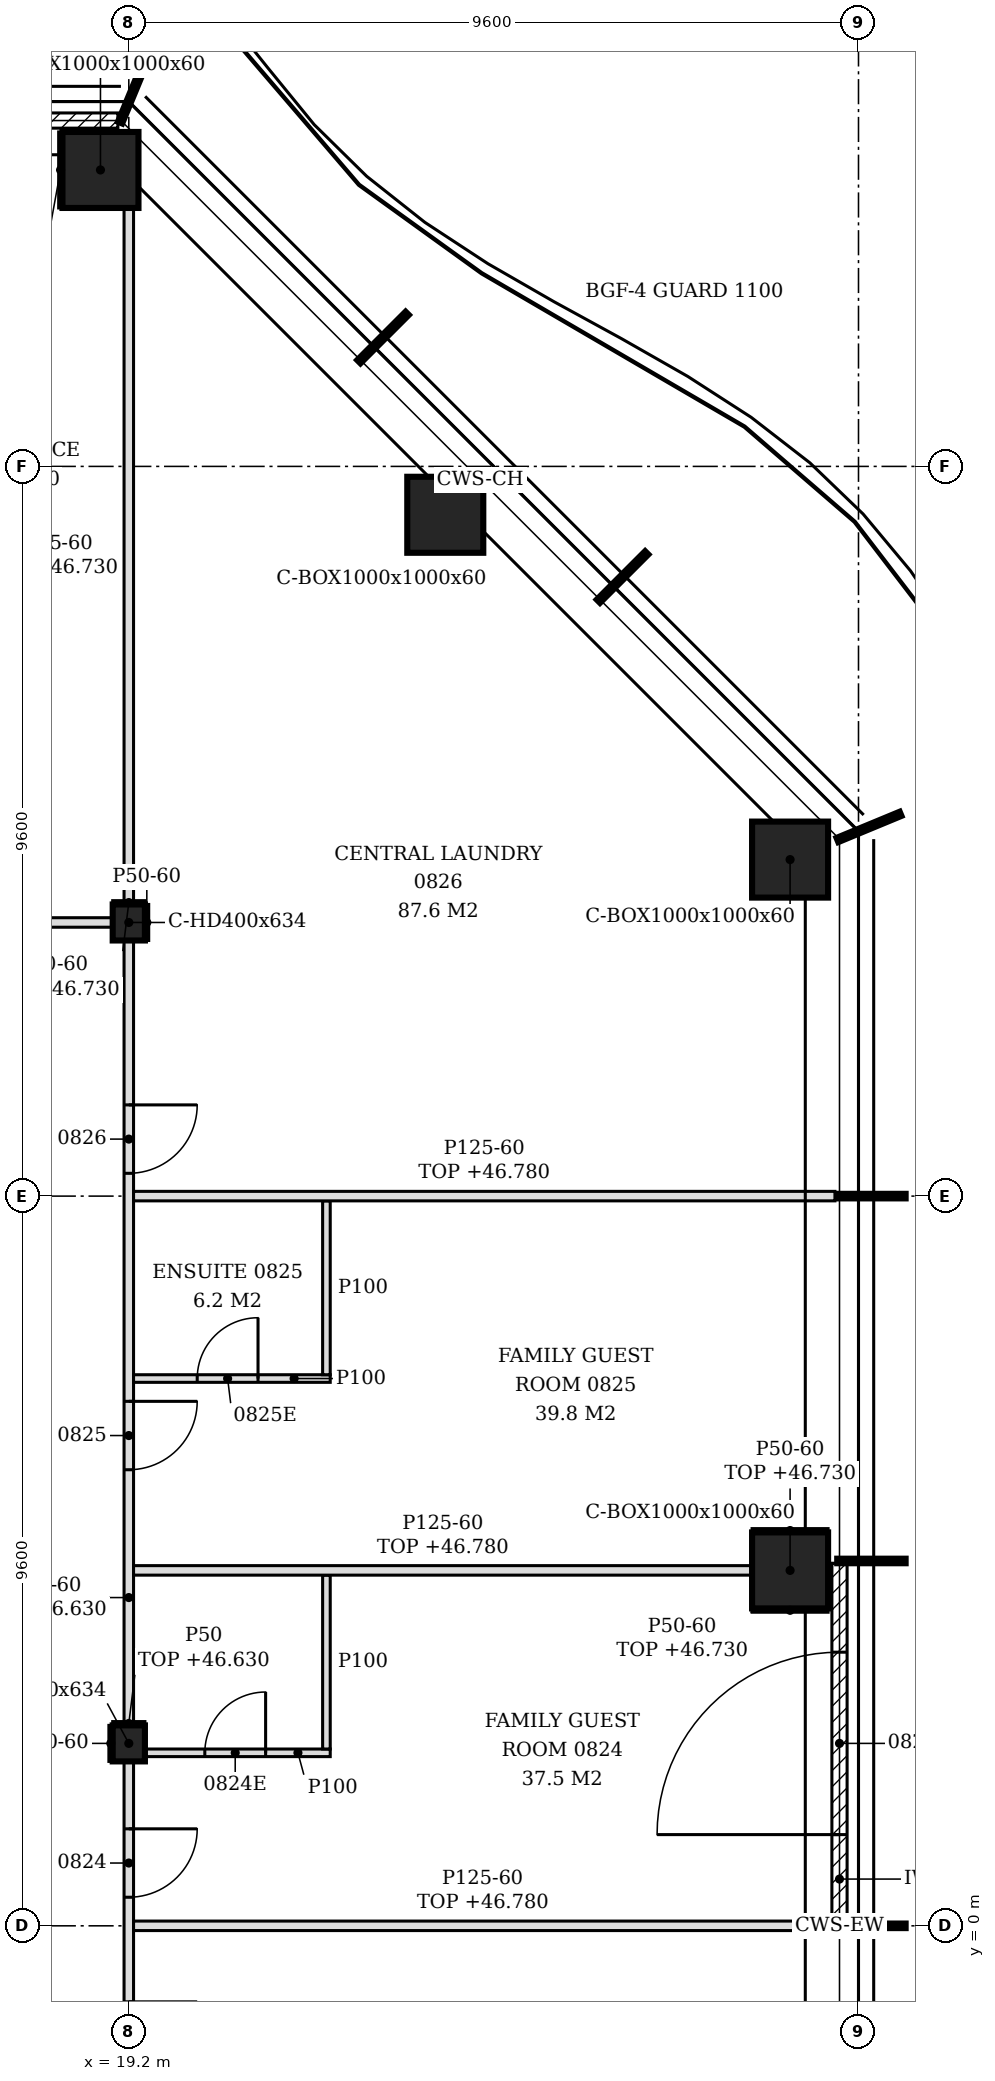
"""IFC4 building model, lengths in metres.
Left out: names, types, materials, properties, quantities, classifications, styles, units other than length and angle.
Written with IfcOpenShell. Run it as: python <this file> out.ifc"""

import sys

from ifc_helpers import new_model, si_unit, direction, frame, frame_2d, origin, origin_2d, place, context, subcontext, project, spatial, polyline, rectangle, hollow_rectangle, i_section, outline, extrude, element, fill, save


model = new_model("IFC4")
c1 = context("Model", 3, precision=1e-05, world=origin(), true_north=direction((0.0, 1.0)))
c2 = subcontext(c1, "Body", "Model", "MODEL_VIEW")
j1 = project(units=[si_unit("LENGTHUNIT", "METRE"), si_unit("PLANEANGLEUNIT", "RADIAN")], contexts=[c1])
p1 = place(None, origin())
s1 = spatial("IfcSite", under=j1, at=p1, CompositionType="ELEMENT")
p2 = place(p1, origin())
s2 = spatial("IfcBuilding", under=s1, at=p2, CompositionType="ELEMENT")
p3 = place(p2, frame((0.0, 0.0, 43.8)))
s3 = spatial("IfcBuildingStorey", under=s2, at=p3, CompositionType="ELEMENT", Elevation=43.8)
for number, where, z_axis, x_axis in (
    (1, (27.9, 4.676, -0.15), (0.0, 0.0, 1.0), (1.0, 0.0, 0.0)),
    (2, (27.9, 14.027, -0.15), (0.0, 0.0, 1.0), (1.0, 0.0, 0.0)),
    (3, (23.364, 18.564, -0.15), (0.0, 0.0, 1.0), (1.0, 0.0, 0.0)),
    (4, (18.827, 23.1, -0.15), (0.0, 0.0, 1.0), (1.0, 0.0, 0.0)),
):
    element("IfcColumn", number, at=place(p3, frame(where, z_axis=z_axis, x_axis=x_axis)), inside=s3, PredefinedType="COLUMN", context=c2, shape_type="SweptSolid", body=[
        extrude(hollow_rectangle(XDim=1.0, YDim=1.0, WallThickness=0.06, at=origin_2d()), origin(), (0.0, 0.0, 1.0), 3.6),
    ])
for number, where, z_axis, x_axis in (
    (5, (19.2, 2.4, -0.15), (0.0, 0.0, 1.0), (1.0, 0.0, 0.0)),
    (6, (19.2, 13.2, -0.15), (0.0, 0.0, 1.0), (1.0, 0.0, 0.0)),
):
    element("IfcColumn", number, at=place(p3, frame(where, z_axis=z_axis, x_axis=x_axis)), inside=s3, PredefinedType="COLUMN", context=c2, shape_type="SweptSolid", body=[
        extrude(i_section(OverallWidth=0.424, OverallDepth=0.474, WebThickness=0.048, FlangeThickness=0.077, FilletRadius=0.015, at=origin_2d()), origin(), (0.0, 0.0, 1.0), 3.6),
    ])
p4 = place(p3, frame((28.55, 0.03, 0.0), z_axis=(0.0, 0.0, 1.0), x_axis=(0.0, 1.0, 0.0)))
e7 = element("IfcWall", 7, at=p4, inside=s3, PredefinedType="NOTDEFINED", context=c2, shape_type="SweptSolid", body=[
    extrude(rectangle(XDim=4.74, YDim=0.2, at=frame_2d((2.37, 0.0))), origin(), (0.0, 0.0, 1.0), 3.45),
])
p5 = place(p4, frame((1.17, 0.0, 0.0)))
e8 = element("IfcOpeningElement", 8, at=p5, cuts=e7, PredefinedType="OPENING", context=c2, shape_type="SweptSolid", body=[
    extrude(rectangle(XDim=2.4, YDim=2.4, at=frame_2d((1.2, 1.2))), frame((0.0, 0.11, 0.0), z_axis=(0.0, -1.0, 0.0), x_axis=(1.0, 0.0, 0.0)), (0.0, 0.0, 1.0), 0.22),
])
p6 = place(p3, frame((19.056, 23.75, 0.0), z_axis=(0.0, 0.0, 1.0), x_axis=(-1.0, 0.0, 0.0)))
e9 = element("IfcWall", 9, at=p6, inside=s3, PredefinedType="NOTDEFINED", context=c2, shape_type="SweptSolid", body=[
    extrude(rectangle(XDim=4.626, YDim=0.2, at=frame_2d((2.313, 0.0))), origin(), (0.0, 0.0, 1.0), 3.45),
])
p7 = place(p6, frame((1.108, 0.0, 0.0)))
e10 = element("IfcOpeningElement", 10, at=p7, cuts=e9, PredefinedType="OPENING", context=c2, shape_type="SweptSolid", body=[
    extrude(rectangle(XDim=2.4, YDim=2.4, at=frame_2d((1.2, 1.2))), frame((0.0, 0.11, 0.0), z_axis=(0.0, -1.0, 0.0), x_axis=(1.0, 0.0, 0.0)), (0.0, 0.0, 1.0), 0.22),
])
p8 = place(p3, frame((19.2, -8.163, 0.0), z_axis=(0.0, 0.0, 1.0), x_axis=(0.0, 1.0, 0.0)))
e11 = element("IfcWall", 11, at=p8, inside=s3, PredefinedType="PARTITIONING", context=c2, shape_type="SweptSolid", body=[
    extrude(rectangle(XDim=10.326, YDim=0.125, at=frame_2d((5.163, 0.0))), origin(), (0.0, 0.0, 1.0), 2.83),
])
p9 = place(p8, frame((2.287, 0.0, 0.0)))
e12 = element("IfcOpeningElement", 12, at=p9, cuts=e11, PredefinedType="OPENING", context=c2, shape_type="SweptSolid", body=[
    extrude(rectangle(XDim=0.9, YDim=2.1, at=frame_2d((0.45, 1.05))), frame((0.0, 0.073, 0.0), z_axis=(0.0, -1.0, 0.0), x_axis=(1.0, 0.0, 0.0)), (0.0, 0.0, 1.0), 0.145),
])
p10 = place(p8, frame((6.263, 0.0, 0.0)))
e13 = element("IfcOpeningElement", 13, at=p10, cuts=e11, PredefinedType="OPENING", context=c2, shape_type="SweptSolid", body=[
    extrude(rectangle(XDim=0.9, YDim=2.1, at=frame_2d((0.45, 1.05))), frame((0.0, 0.073, 0.0), z_axis=(0.0, -1.0, 0.0), x_axis=(1.0, 0.0, 0.0)), (0.0, 0.0, 1.0), 0.145),
])
p11 = place(p8, frame((8.539, 0.0, 0.0)))
e14 = element("IfcOpeningElement", 14, at=p11, cuts=e11, PredefinedType="OPENING", context=c2, shape_type="SweptSolid", body=[
    extrude(rectangle(XDim=0.9, YDim=2.1, at=frame_2d((0.45, 1.05))), frame((0.0, 0.073, 0.0), z_axis=(0.0, -1.0, 0.0), x_axis=(1.0, 0.0, 0.0)), (0.0, 0.0, 1.0), 0.145),
])
p12 = place(p3, frame((19.262, 0.0, 0.0), z_axis=(0.0, 0.0, 1.0), x_axis=(1.0, 0.0, 0.0)))
e15 = element("IfcWall", 15, at=p12, inside=s3, PredefinedType="PARTITIONING", context=c2, shape_type="SweptSolid", body=[
    extrude(outline(polyline([(0.0, 0.0), (9.188, 0.0), (9.188, 2.98), (8.788, 2.98), (8.785, 2.93), (8.488, 2.93), (8.486, 2.98), (0.087, 2.98), (0.085, 2.83), (0.0, 2.83), (0.0, 0.0)])), frame((0.0, 0.062, 0.0), z_axis=(0.0, -1.0, 0.0), x_axis=(1.0, 0.0, 0.0)), (0.0, 0.0, 1.0), 0.125),
])
p13 = place(p3, frame((19.412, 2.276, 0.0), z_axis=(0.0, 0.0, 1.0), x_axis=(1.0, 0.0, 0.0)))
e16 = element("IfcWall", 16, at=p13, inside=s3, PredefinedType="PARTITIONING", context=c2, shape_type="SweptSolid", body=[
    extrude(rectangle(XDim=2.438, YDim=0.1, at=frame_2d((1.219, 0.0))), origin(), (0.0, 0.0, 1.0), 3.45),
])
p14 = place(p13, frame((0.788, 0.0, 0.0)))
e17 = element("IfcOpeningElement", 17, at=p14, cuts=e16, PredefinedType="OPENING", context=c2, shape_type="SweptSolid", body=[
    extrude(rectangle(XDim=0.8, YDim=2.1, at=frame_2d((0.4, 1.05))), frame((0.0, 0.06, 0.0), z_axis=(0.0, -1.0, 0.0), x_axis=(1.0, 0.0, 0.0)), (0.0, 0.0, 1.0), 0.12),
])
p15 = place(p3, frame((21.8, 2.326, 0.0), z_axis=(0.0, 0.0, 1.0), x_axis=(0.0, 1.0, 0.0)))
e18 = element("IfcWall", 18, at=p15, inside=s3, PredefinedType="PARTITIONING", context=c2, shape_type="SweptSolid", body=[
    extrude(rectangle(XDim=2.288, YDim=0.1, at=frame_2d((1.144, 0.0))), origin(), (0.0, 0.0, 1.0), 3.45),
])
p16 = place(p3, frame((19.2, 2.637, 0.0), z_axis=(0.0, 0.0, 1.0), x_axis=(0.0, 1.0, 0.0)))
e19 = element("IfcWall", 19, at=p16, inside=s3, PredefinedType="PARTITIONING", context=c2, shape_type="SweptSolid", body=[
    extrude(rectangle(XDim=10.326, YDim=0.125, at=frame_2d((5.163, 0.0))), origin(), (0.0, 0.0, 1.0), 2.83),
])
p17 = place(p16, frame((3.363, 0.0, 0.0)))
e20 = element("IfcOpeningElement", 20, at=p17, cuts=e19, PredefinedType="OPENING", context=c2, shape_type="SweptSolid", body=[
    extrude(rectangle(XDim=0.9, YDim=2.1, at=frame_2d((0.45, 1.05))), frame((0.0, 0.073, 0.0), z_axis=(0.0, -1.0, 0.0), x_axis=(1.0, 0.0, 0.0)), (0.0, 0.0, 1.0), 0.145),
])
p18 = place(p16, frame((7.263, 0.0, 0.0)))
e21 = element("IfcOpeningElement", 21, at=p18, cuts=e19, PredefinedType="OPENING", context=c2, shape_type="SweptSolid", body=[
    extrude(rectangle(XDim=0.9, YDim=2.1, at=frame_2d((0.45, 1.05))), frame((0.0, 0.073, 0.0), z_axis=(0.0, -1.0, 0.0), x_axis=(1.0, 0.0, 0.0)), (0.0, 0.0, 1.0), 0.145),
])
p19 = place(p3, frame((19.262, 4.676, 0.0), z_axis=(0.0, 0.0, 1.0), x_axis=(1.0, 0.0, 0.0)))
e22 = element("IfcWall", 22, at=p19, inside=s3, PredefinedType="PARTITIONING", context=c2, shape_type="SweptSolid", body=[
    extrude(outline(polyline([(0.0, 0.0), (8.137, 0.0), (8.137, 2.98), (0.087, 2.98), (0.085, 2.83), (0.0, 2.83), (0.0, 0.0)])), frame((0.0, 0.062, 0.0), z_axis=(0.0, -1.0, 0.0), x_axis=(1.0, 0.0, 0.0)), (0.0, 0.0, 1.0), 0.125),
])
p20 = place(p3, frame((19.262, 7.2, 0.0), z_axis=(0.0, 0.0, 1.0), x_axis=(1.0, 0.0, 0.0)))
e23 = element("IfcWall", 23, at=p20, inside=s3, PredefinedType="PARTITIONING", context=c2, shape_type="SweptSolid", body=[
    extrude(outline(polyline([(0.0, 0.0), (2.588, 0.0), (2.587, 3.45), (0.087, 3.45), (0.085, 2.83), (0.0, 2.83), (0.0, 0.0)])), frame((0.0, 0.05, 0.0), z_axis=(0.0, -1.0, 0.0), x_axis=(1.0, 0.0, 0.0)), (0.0, 0.0, 1.0), 0.1),
])
p21 = place(p20, frame((0.837, 0.0, 0.0)))
e24 = element("IfcOpeningElement", 24, at=p21, cuts=e23, PredefinedType="OPENING", context=c2, shape_type="SweptSolid", body=[
    extrude(rectangle(XDim=0.8, YDim=2.1, at=frame_2d((0.4, 1.05))), frame((0.0, 0.06, 0.0), z_axis=(0.0, -1.0, 0.0), x_axis=(1.0, 0.0, 0.0)), (0.0, 0.0, 1.0), 0.12),
])
p22 = place(p3, frame((21.8, 7.25, 0.0), z_axis=(0.0, 0.0, 1.0), x_axis=(0.0, 1.0, 0.0)))
e25 = element("IfcWall", 25, at=p22, inside=s3, PredefinedType="PARTITIONING", context=c2, shape_type="SweptSolid", body=[
    extrude(outline(polyline([(0.0, 0.0), (2.288, 0.0), (2.288, 2.98), (2.255, 2.98), (2.253, 3.45), (0.0, 3.45), (0.0, 0.0)])), frame((0.0, 0.05, 0.0), z_axis=(0.0, -1.0, 0.0), x_axis=(1.0, 0.0, 0.0)), (0.0, 0.0, 1.0), 0.1),
])
p23 = place(p3, frame((19.262, 9.6, 0.0), z_axis=(0.0, 0.0, 1.0), x_axis=(1.0, 0.0, 0.0)))
e26 = element("IfcWall", 26, at=p23, inside=s3, PredefinedType="PARTITIONING", context=c2, shape_type="SweptSolid", body=[
    extrude(outline(polyline([(0.0, 0.0), (9.228, 0.0), (9.228, 2.98), (8.788, 2.98), (8.785, 2.93), (8.488, 2.93), (8.486, 2.98), (0.087, 2.98), (0.085, 2.83), (0.0, 2.83), (0.0, 0.0)])), frame((0.0, 0.062, 0.0), z_axis=(0.0, -1.0, 0.0), x_axis=(1.0, 0.0, 0.0)), (0.0, 0.0, 1.0), 0.125),
])
p24 = place(p3, frame((7.412, 13.2, 0.0), z_axis=(0.0, 0.0, 1.0), x_axis=(1.0, 0.0, 0.0)))
e27 = element("IfcWall", 27, at=p24, inside=s3, PredefinedType="PARTITIONING", context=c2, shape_type="SweptSolid", body=[
    extrude(rectangle(XDim=11.576, YDim=0.125, at=frame_2d((5.788, 0.0))), origin(), (0.0, 0.0, 1.0), 2.83),
])
p25 = place(p24, frame((0.788, 0.0, 0.0)))
e28 = element("IfcOpeningElement", 28, at=p25, cuts=e27, PredefinedType="OPENING", context=c2, shape_type="SweptSolid", body=[
    extrude(rectangle(XDim=0.9, YDim=2.1, at=frame_2d((0.45, 1.05))), frame((0.0, 0.073, 0.0), z_axis=(0.0, -1.0, 0.0), x_axis=(1.0, 0.0, 0.0)), (0.0, 0.0, 1.0), 0.145),
])
p26 = place(p24, frame((2.302, 0.0, 0.0)))
e29 = element("IfcOpeningElement", 29, at=p26, cuts=e27, PredefinedType="OPENING", context=c2, shape_type="SweptSolid", body=[
    extrude(rectangle(XDim=0.9, YDim=2.1, at=frame_2d((0.45, 1.05))), frame((0.0, 0.073, 0.0), z_axis=(0.0, -1.0, 0.0), x_axis=(1.0, 0.0, 0.0)), (0.0, 0.0, 1.0), 0.145),
])
p27 = place(p24, frame((7.288, 0.0, 0.0)))
e30 = element("IfcOpeningElement", 30, at=p27, cuts=e27, PredefinedType="OPENING", context=c2, shape_type="SweptSolid", body=[
    extrude(rectangle(XDim=0.9, YDim=2.1, at=frame_2d((0.45, 1.05))), frame((0.0, 0.073, 0.0), z_axis=(0.0, -1.0, 0.0), x_axis=(1.0, 0.0, 0.0)), (0.0, 0.0, 1.0), 0.145),
])
p28 = place(p3, frame((19.2, 13.437, 0.0), z_axis=(0.0, 0.0, 1.0), x_axis=(0.0, 1.0, 0.0)))
e31 = element("IfcWall", 31, at=p28, inside=s3, PredefinedType="PARTITIONING", context=c2, shape_type="SweptSolid", body=[
    extrude(outline(polyline([(0.0, 0.0), (9.163, 0.0), (9.163, 2.63), (8.733, 2.63), (8.731, 2.93), (0.0, 2.93), (0.0, 0.0)])), frame((0.0, 0.062, 0.0), z_axis=(0.0, -1.0, 0.0), x_axis=(1.0, 0.0, 0.0)), (0.0, 0.0, 1.0), 0.125),
])
p29 = place(p3, frame((18.963, 2.163, 0.0), z_axis=(0.0, 0.0, 1.0), x_axis=(0.0, 1.0, 0.0)))
e32 = element("IfcWall", 32, at=p29, inside=s3, PredefinedType="PARTITIONING", context=c2, shape_type="SweptSolid", body=[
    extrude(rectangle(XDim=0.474, YDim=0.05, at=frame_2d((0.237, 0.0))), origin(), (0.0, 0.0, 1.0), 3.45),
])
p30 = place(p3, frame((19.437, 12.963, 0.0), z_axis=(0.0, 0.0, 1.0), x_axis=(0.0, 1.0, 0.0)))
e33 = element("IfcWall", 33, at=p30, inside=s3, PredefinedType="PARTITIONING", context=c2, shape_type="SweptSolid", body=[
    extrude(rectangle(XDim=0.474, YDim=0.05, at=frame_2d((0.237, 0.0))), origin(), (0.0, 0.0, 1.0), 3.45),
])
p31 = place(p3, frame((18.988, 2.662, 0.0), z_axis=(0.0, 0.0, 1.0), x_axis=(1.0, 0.0, 0.0)))
e34 = element("IfcWall", 34, at=p31, inside=s3, PredefinedType="PARTITIONING", context=c2, shape_type="SweptSolid", body=[
    extrude(rectangle(XDim=0.424, YDim=0.05, at=frame_2d((0.212, 0.0))), origin(), (0.0, 0.0, 1.0), 2.83),
])
for number, where, z_axis, x_axis in (
    (35, (27.4, 5.201, 0.0), (0.0, 0.0, 1.0), (1.0, 0.0, 0.0)),
    (36, (27.4, 4.151, 0.0), (0.0, 0.0, 1.0), (1.0, 0.0, 0.0)),
):
    element("IfcWall", number, at=place(p3, frame(where, z_axis=z_axis, x_axis=x_axis)), inside=s3, PredefinedType="PARTITIONING", context=c2, shape_type="SweptSolid", body=[
        extrude(rectangle(XDim=1.0, YDim=0.05, at=frame_2d((0.5, 0.0))), origin(), (0.0, 0.0, 1.0), 2.93),
    ])
p32 = place(p3, frame((18.988, 13.462, 0.0), z_axis=(0.0, 0.0, 1.0), x_axis=(1.0, 0.0, 0.0)))
e37 = element("IfcWall", 37, at=p32, inside=s3, PredefinedType="PARTITIONING", context=c2, shape_type="SweptSolid", body=[
    extrude(rectangle(XDim=0.424, YDim=0.05, at=frame_2d((0.212, 0.0))), origin(), (0.0, 0.0, 1.0), 2.93),
])
p33 = place(p3, frame((18.302, 22.6, 0.0), z_axis=(0.0, 0.0, 1.0), x_axis=(0.0, 1.0, 0.0)))
e38 = element("IfcWall", 38, at=p33, inside=s3, PredefinedType="PARTITIONING", context=c2, shape_type="SweptSolid", body=[
    extrude(rectangle(XDim=1.0, YDim=0.05, at=frame_2d((0.5, 0.0))), origin(), (0.0, 0.0, 1.0), 2.93),
])
p34 = place(p5, origin())
e39 = element("IfcDoor", 39, at=p34, inside=s3, OperationType="SINGLE_SWING_LEFT", PredefinedType="DOOR", context=c2, shape_type="SweptSolid", body=[
    extrude(rectangle(XDim=2.4, YDim=2.4, at=frame_2d((1.2, 1.2))), frame((0.0, 0.025, 0.0), z_axis=(0.0, -1.0, 0.0), x_axis=(1.0, 0.0, 0.0)), (0.0, 0.0, 1.0), 0.05),
])
fill(e8, e39)
p35 = place(p11, frame((0.9, 0.0, 0.0), z_axis=(0.0, 0.0, 1.0), x_axis=(-1.0, 0.0, 0.0)))
e40 = element("IfcDoor", 40, at=p35, inside=s3, OperationType="SINGLE_SWING_LEFT", PredefinedType="DOOR", context=c2, shape_type="SweptSolid", body=[
    extrude(rectangle(XDim=0.9, YDim=2.1, at=frame_2d((0.45, 1.05))), frame((0.0, 0.025, 0.0), z_axis=(0.0, -1.0, 0.0), x_axis=(1.0, 0.0, 0.0)), (0.0, 0.0, 1.0), 0.05),
])
fill(e14, e40)
p36 = place(p14, origin())
e41 = element("IfcDoor", 41, at=p36, inside=s3, OperationType="SINGLE_SWING_RIGHT", PredefinedType="DOOR", context=c2, shape_type="SweptSolid", body=[
    extrude(rectangle(XDim=0.8, YDim=2.1, at=frame_2d((0.4, 1.05))), frame((0.0, 0.025, 0.0), z_axis=(0.0, -1.0, 0.0), x_axis=(1.0, 0.0, 0.0)), (0.0, 0.0, 1.0), 0.05),
])
fill(e17, e41)
p37 = place(p17, frame((0.9, 0.0, 0.0), z_axis=(0.0, 0.0, 1.0), x_axis=(-1.0, 0.0, 0.0)))
e42 = element("IfcDoor", 42, at=p37, inside=s3, OperationType="SINGLE_SWING_LEFT", PredefinedType="DOOR", context=c2, shape_type="SweptSolid", body=[
    extrude(rectangle(XDim=0.9, YDim=2.1, at=frame_2d((0.45, 1.05))), frame((0.0, 0.025, 0.0), z_axis=(0.0, -1.0, 0.0), x_axis=(1.0, 0.0, 0.0)), (0.0, 0.0, 1.0), 0.05),
])
fill(e20, e42)
p38 = place(p21, origin())
e43 = element("IfcDoor", 43, at=p38, inside=s3, OperationType="SINGLE_SWING_RIGHT", PredefinedType="DOOR", context=c2, shape_type="SweptSolid", body=[
    extrude(rectangle(XDim=0.8, YDim=2.1, at=frame_2d((0.4, 1.05))), frame((0.0, 0.025, 0.0), z_axis=(0.0, -1.0, 0.0), x_axis=(1.0, 0.0, 0.0)), (0.0, 0.0, 1.0), 0.05),
])
fill(e24, e43)
p39 = place(p18, frame((0.9, 0.0, 0.0), z_axis=(0.0, 0.0, 1.0), x_axis=(-1.0, 0.0, 0.0)))
e44 = element("IfcDoor", 44, at=p39, inside=s3, OperationType="SINGLE_SWING_LEFT", PredefinedType="DOOR", context=c2, shape_type="SweptSolid", body=[
    extrude(rectangle(XDim=0.9, YDim=2.1, at=frame_2d((0.45, 1.05))), frame((0.0, 0.025, 0.0), z_axis=(0.0, -1.0, 0.0), x_axis=(1.0, 0.0, 0.0)), (0.0, 0.0, 1.0), 0.05),
])
fill(e21, e44)
save(model, sys.argv[1])
